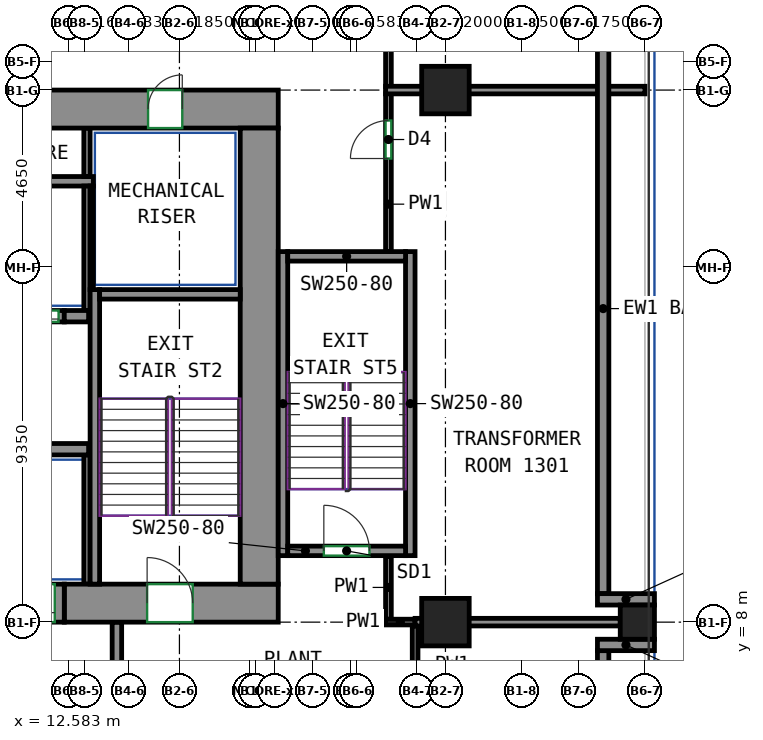
"""IFC4 building model, lengths in metres.
Left out: names, types, materials, properties, quantities, classifications, styles, units other than length and angle.
Written with IfcOpenShell. Run it as: python <this file> out.ifc"""

import sys

from ifc_helpers import new_model, si_unit, direction, frame, frame_2d, origin, origin_2d, place, context, subcontext, project, spatial, rectangle, extrude, source, transform, mapped, element, fill, save


model = new_model("IFC4")
c1 = context("Model", 3, precision=1e-05, world=origin(), true_north=direction((0.0, 1.0)))
c2 = subcontext(c1, "Body", "Model", "MODEL_VIEW")
j1 = project(units=[si_unit("LENGTHUNIT", "METRE"), si_unit("PLANEANGLEUNIT", "RADIAN")], contexts=[c1])
p1 = place(None, origin())
s1 = spatial("IfcSite", under=j1, at=p1, CompositionType="ELEMENT")
p2 = place(p1, origin())
s2 = spatial("IfcBuilding", under=s1, at=p2, CompositionType="ELEMENT")
p3 = place(p2, frame((0.0, 0.0, 59.0)))
s3 = spatial("IfcBuildingStorey", under=s2, at=p3, CompositionType="ELEMENT", Elevation=59.0)
m1 = source(origin(), c2, "Body", "SweptSolid", [
    extrude(rectangle(XDim=0.9, YDim=0.9, at=origin_2d()), origin(), (0.0, 0.0, 1.0), 3.8),
])
p4 = place(p3, frame((27.55, 8.0, 0.0), z_axis=(0.0, 0.0, 1.0), x_axis=(1.0, 0.0, 0.0)))
e1 = element("IfcColumn", 1, at=p4, inside=s3, PredefinedType="COLUMN", context=c2, shape_type="MappedRepresentation", body=[
    mapped(m1, transform((0.0, 0.0, 0.0))),
])
m2 = source(origin(), c2, "Body", "SweptSolid", [
    extrude(rectangle(XDim=1.25, YDim=1.25, at=origin_2d()), origin(), (0.0, 0.0, 1.0), 3.8),
])
for number, where, z_axis, x_axis in (
    (2, (22.5, 8.0, 0.0), (0.0, 0.0, 1.0), (1.0, 0.0, 0.0)),
    (3, (22.5, 22.0, 0.0), (0.0, 0.0, 1.0), (1.0, 0.0, 0.0)),
):
    element("IfcColumn", number, at=place(p3, frame(where, z_axis=z_axis, x_axis=x_axis)), inside=s3, PredefinedType="COLUMN", context=c2, shape_type="MappedRepresentation", body=[
        mapped(m2, transform((0.0, 0.0, 0.0))),
    ])
m3 = source(origin(), c2, "Body", "SweptSolid", [
    extrude(rectangle(XDim=5.63, YDim=1.0, at=frame_2d((2.815, 0.0))), origin(), (0.0, 0.0, 1.0), 3.8),
])
p5 = place(p3, frame((12.47, 8.5, 0.0), z_axis=(0.0, 0.0, 1.0), x_axis=(1.0, 0.0, 0.0)))
e4 = element("IfcWall", 4, at=p5, inside=s3, PredefinedType="SHEAR", context=c2, shape_type="MappedRepresentation", body=[
    mapped(m3, transform((0.0, 0.0, 0.0))),
])
p6 = place(p5, frame((2.18, 0.0, 0.0)))
e5 = element("IfcOpeningElement", 5, at=p6, cuts=e4, PredefinedType="OPENING", context=c2, shape_type="SweptSolid", body=[
    extrude(rectangle(XDim=1.2, YDim=2.1, at=frame_2d((0.6, 1.05))), frame((0.0, 0.51, 0.0), z_axis=(0.0, -1.0, 0.0), x_axis=(1.0, 0.0, 0.0)), (0.0, 0.0, 1.0), 1.02),
])
m4 = source(origin(), c2, "Body", "SweptSolid", [
    extrude(rectangle(XDim=34.1, YDim=1.0, at=frame_2d((17.05, 0.0))), origin(), (0.0, 0.0, 1.0), 3.8),
])
p7 = place(p3, frame((-16.0, 21.5, 0.0), z_axis=(0.0, 0.0, 1.0), x_axis=(1.0, 0.0, 0.0)))
e6 = element("IfcWall", 6, at=p7, inside=s3, PredefinedType="SHEAR", context=c2, shape_type="MappedRepresentation", body=[
    mapped(m4, transform((0.0, 0.0, 0.0))),
])
p8 = place(p7, frame((6.831, 0.0, 0.0)))
e7 = element("IfcOpeningElement", 7, at=p8, cuts=e6, PredefinedType="OPENING", context=c2, shape_type="SweptSolid", body=[
    extrude(rectangle(XDim=0.9, YDim=2.1, at=frame_2d((0.45, 1.05))), frame((0.0, 0.51, 0.0), z_axis=(0.0, -1.0, 0.0), x_axis=(1.0, 0.0, 0.0)), (0.0, 0.0, 1.0), 1.02),
])
p9 = place(p7, frame((12.138, 0.0, 0.0)))
e8 = element("IfcOpeningElement", 8, at=p9, cuts=e6, PredefinedType="OPENING", context=c2, shape_type="SweptSolid", body=[
    extrude(rectangle(XDim=0.9, YDim=2.1, at=frame_2d((0.45, 1.05))), frame((0.0, 0.51, 0.0), z_axis=(0.0, -1.0, 0.0), x_axis=(1.0, 0.0, 0.0)), (0.0, 0.0, 1.0), 1.02),
])
p10 = place(p7, frame((17.565, 0.0, 0.0)))
e9 = element("IfcOpeningElement", 9, at=p10, cuts=e6, PredefinedType="OPENING", context=c2, shape_type="SweptSolid", body=[
    extrude(rectangle(XDim=0.9, YDim=2.1, at=frame_2d((0.45, 1.05))), frame((0.0, 0.51, 0.0), z_axis=(0.0, -1.0, 0.0), x_axis=(1.0, 0.0, 0.0)), (0.0, 0.0, 1.0), 1.02),
])
p11 = place(p7, frame((21.786, 0.0, 0.0)))
e10 = element("IfcOpeningElement", 10, at=p11, cuts=e6, PredefinedType="OPENING", context=c2, shape_type="SweptSolid", body=[
    extrude(rectangle(XDim=0.9, YDim=2.1, at=frame_2d((0.45, 1.05))), frame((0.0, 0.51, 0.0), z_axis=(0.0, -1.0, 0.0), x_axis=(1.0, 0.0, 0.0)), (0.0, 0.0, 1.0), 1.02),
])
p12 = place(p7, frame((26.127, 0.0, 0.0)))
e11 = element("IfcOpeningElement", 11, at=p12, cuts=e6, PredefinedType="OPENING", context=c2, shape_type="SweptSolid", body=[
    extrude(rectangle(XDim=0.9, YDim=2.1, at=frame_2d((0.45, 1.05))), frame((0.0, 0.51, 0.0), z_axis=(0.0, -1.0, 0.0), x_axis=(1.0, 0.0, 0.0)), (0.0, 0.0, 1.0), 1.02),
])
p13 = place(p7, frame((2.525, 0.0, 0.0)))
e12 = element("IfcOpeningElement", 12, at=p13, cuts=e6, PredefinedType="OPENING", context=c2, shape_type="SweptSolid", body=[
    extrude(rectangle(XDim=0.9, YDim=2.1, at=frame_2d((0.45, 1.05))), frame((0.0, 0.51, 0.0), z_axis=(0.0, -1.0, 0.0), x_axis=(1.0, 0.0, 0.0)), (0.0, 0.0, 1.0), 1.02),
])
p14 = place(p7, frame((30.675, 0.0, 0.0)))
e13 = element("IfcOpeningElement", 13, at=p14, cuts=e6, PredefinedType="OPENING", context=c2, shape_type="SweptSolid", body=[
    extrude(rectangle(XDim=0.9, YDim=2.1, at=frame_2d((0.45, 1.05))), frame((0.0, 0.51, 0.0), z_axis=(0.0, -1.0, 0.0), x_axis=(1.0, 0.0, 0.0)), (0.0, 0.0, 1.0), 1.02),
])
m5 = source(origin(), c2, "Body", "SweptSolid", [
    extrude(rectangle(XDim=12.0, YDim=1.0, at=frame_2d((6.0, 0.0))), origin(), (0.0, 0.0, 1.0), 3.8),
])
p15 = place(p3, frame((17.6, 9.0, 0.0), z_axis=(0.0, 0.0, 1.0), x_axis=(0.0, 1.0, 0.0)))
e14 = element("IfcWall", 14, at=p15, inside=s3, PredefinedType="SHEAR", context=c2, shape_type="MappedRepresentation", body=[
    mapped(m5, transform((0.0, 0.0, 0.0))),
])
m6 = source(origin(), c2, "Body", "SweptSolid", [
    extrude(rectangle(XDim=7.75, YDim=0.25, at=frame_2d((3.875, 0.0))), origin(), (0.0, 0.0, 1.0), 3.8),
])
p16 = place(p3, frame((13.275, 9.0, 0.0), z_axis=(0.0, 0.0, 1.0), x_axis=(0.0, 1.0, 0.0)))
e15 = element("IfcWall", 15, at=p16, inside=s3, PredefinedType="SHEAR", context=c2, shape_type="MappedRepresentation", body=[
    mapped(m6, transform((0.0, 0.0, 0.0))),
])
m7 = source(origin(), c2, "Body", "SweptSolid", [
    extrude(rectangle(XDim=3.7, YDim=0.25, at=frame_2d((1.85, 0.0))), origin(), (0.0, 0.0, 1.0), 3.8),
])
p17 = place(p3, frame((13.4, 16.625, 0.0), z_axis=(0.0, 0.0, 1.0), x_axis=(1.0, 0.0, 0.0)))
e16 = element("IfcWall", 16, at=p17, inside=s3, PredefinedType="SHEAR", context=c2, shape_type="MappedRepresentation", body=[
    mapped(m7, transform((0.0, 0.0, 0.0))),
])
m8 = source(origin(), c2, "Body", "SweptSolid", [
    extrude(rectangle(XDim=8.0, YDim=0.25, at=frame_2d((4.0, 0.0))), origin(), (0.0, 0.0, 1.0), 3.8),
])
for number, where, z_axis, x_axis in (
    (17, (18.225, 9.75, 0.0), (0.0, 0.0, 1.0), (0.0, 1.0, 0.0)),
    (18, (21.575, 9.75, 0.0), (0.0, 0.0, 1.0), (0.0, 1.0, 0.0)),
):
    element("IfcWall", number, at=place(p3, frame(where, z_axis=z_axis, x_axis=x_axis)), inside=s3, PredefinedType="SHEAR", context=c2, shape_type="MappedRepresentation", body=[
        mapped(m8, transform((0.0, 0.0, 0.0))),
    ])
m9 = source(origin(), c2, "Body", "SweptSolid", [
    extrude(rectangle(XDim=3.1, YDim=0.25, at=frame_2d((1.55, 0.0))), origin(), (0.0, 0.0, 1.0), 3.8),
])
p18 = place(p3, frame((18.35, 9.875, 0.0), z_axis=(0.0, 0.0, 1.0), x_axis=(1.0, 0.0, 0.0)))
e19 = element("IfcWall", 19, at=p18, inside=s3, PredefinedType="SHEAR", context=c2, shape_type="MappedRepresentation", body=[
    mapped(m9, transform((0.0, 0.0, 0.0))),
])
p19 = place(p18, frame((0.95, 0.0, 0.0)))
e20 = element("IfcOpeningElement", 20, at=p19, cuts=e19, PredefinedType="OPENING", context=c2, shape_type="SweptSolid", body=[
    extrude(rectangle(XDim=1.2, YDim=2.1, at=frame_2d((0.6, 1.05))), frame((0.0, 0.135, 0.0), z_axis=(0.0, -1.0, 0.0), x_axis=(1.0, 0.0, 0.0)), (0.0, 0.0, 1.0), 0.27),
])
p20 = place(p3, frame((18.35, 17.625, 0.0), z_axis=(0.0, 0.0, 1.0), x_axis=(1.0, 0.0, 0.0)))
e21 = element("IfcWall", 21, at=p20, inside=s3, PredefinedType="SHEAR", context=c2, shape_type="MappedRepresentation", body=[
    mapped(m9, transform((0.0, 0.0, 0.0))),
])
m10 = source(origin(), c2, "Body", "SweptSolid", [
    extrude(rectangle(XDim=2.82, YDim=0.3, at=frame_2d((1.41, 0.0))), origin(), (0.0, 0.0, 1.0), 3.8),
])
p21 = place(p3, frame((10.29, 12.55, 0.0), z_axis=(0.0, 0.0, 1.0), x_axis=(1.0, 0.0, 0.0)))
e22 = element("IfcWall", 22, at=p21, inside=s3, PredefinedType="SHEAR", context=c2, shape_type="MappedRepresentation", body=[
    mapped(m10, transform((0.0, 0.0, 0.0))),
])
m11 = source(origin(), c2, "Body", "SweptSolid", [
    extrude(rectangle(XDim=0.64, YDim=0.3, at=frame_2d((0.32, 0.0))), origin(), (0.0, 0.0, 1.0), 3.8),
])
p22 = place(p3, frame((12.47, 16.05, 0.0), z_axis=(0.0, 0.0, 1.0), x_axis=(1.0, 0.0, 0.0)))
e23 = element("IfcWall", 23, at=p22, inside=s3, PredefinedType="SHEAR", context=c2, shape_type="MappedRepresentation", body=[
    mapped(m11, transform((0.0, 0.0, 0.0))),
])
m12 = source(origin(), c2, "Body", "SweptSolid", [
    extrude(rectangle(XDim=7.5, YDim=0.3, at=frame_2d((3.75, 0.0))), origin(), (0.0, 0.0, 1.0), 1.1),
])
p23 = place(p3, frame((26.65, -0.25, 0.0), z_axis=(0.0, 0.0, 1.0), x_axis=(0.0, 1.0, 0.0)))
e24 = element("IfcWall", 24, at=p23, inside=s3, PredefinedType="SOLIDWALL", context=c2, shape_type="MappedRepresentation", body=[
    mapped(m12, transform((0.0, 0.0, 0.0))),
])
m13 = source(origin(), c2, "Body", "SweptSolid", [
    extrude(rectangle(XDim=1.5, YDim=0.3, at=frame_2d((0.75, 0.0))), origin(), (0.0, 0.0, 1.0), 3.8),
])
p24 = place(p3, frame((28.0, 7.4, 0.0), z_axis=(0.0, 0.0, 1.0), x_axis=(-1.0, 0.0, 0.0)))
e25 = element("IfcWall", 25, at=p24, inside=s3, PredefinedType="SOLIDWALL", context=c2, shape_type="MappedRepresentation", body=[
    mapped(m13, transform((0.0, 0.0, 0.0))),
])
m14 = source(origin(), c2, "Body", "SweptSolid", [
    extrude(rectangle(XDim=15.0, YDim=0.3, at=frame_2d((7.5, 0.0))), origin(), (0.0, 0.0, 1.0), 1.1),
])
p25 = place(p3, frame((26.65, 8.75, 0.0), z_axis=(0.0, 0.0, 1.0), x_axis=(0.0, 1.0, 0.0)))
e26 = element("IfcWall", 26, at=p25, inside=s3, PredefinedType="SOLIDWALL", context=c2, shape_type="MappedRepresentation", body=[
    mapped(m14, transform((0.0, 0.0, 0.0))),
])
p26 = place(p3, frame((28.0, 8.6, 0.0), z_axis=(0.0, 0.0, 1.0), x_axis=(-1.0, 0.0, 0.0)))
e27 = element("IfcWall", 27, at=p26, inside=s3, PredefinedType="SOLIDWALL", context=c2, shape_type="MappedRepresentation", body=[
    mapped(m13, transform((0.0, 0.0, 0.0))),
])
m15 = source(origin(), c2, "Body", "SweptSolid", [
    extrude(rectangle(XDim=1.4, YDim=0.3, at=frame_2d((0.7, 0.0))), origin(), (0.0, 0.0, 1.0), 3.8),
])
p27 = place(p3, frame((11.07, 16.05, 0.0), z_axis=(0.0, 0.0, 1.0), x_axis=(1.0, 0.0, 0.0)))
e28 = element("IfcWall", 28, at=p27, inside=s3, PredefinedType="PARTITIONING", context=c2, shape_type="MappedRepresentation", body=[
    mapped(m15, transform((0.0, 0.0, 0.0))),
])
p28 = place(p27, frame((0.15, 0.0, 0.0)))
e29 = element("IfcOpeningElement", 29, at=p28, cuts=e28, PredefinedType="OPENING", context=c2, shape_type="SweptSolid", body=[
    extrude(rectangle(XDim=1.1, YDim=2.1, at=frame_2d((0.55, 1.05))), frame((0.0, 0.16, 0.0), z_axis=(0.0, -1.0, 0.0), x_axis=(1.0, 0.0, 0.0)), (0.0, 0.0, 1.0), 0.32),
])
m16 = source(origin(), c2, "Body", "SweptSolid", [
    extrude(rectangle(XDim=2.65, YDim=0.25, at=frame_2d((1.325, 0.0))), origin(), (0.0, 0.0, 1.0), 3.8),
])
p29 = place(p3, frame((13.855, 5.35, 0.0), z_axis=(0.0, 0.0, 1.0), x_axis=(0.0, 1.0, 0.0)))
e30 = element("IfcWall", 30, at=p29, inside=s3, PredefinedType="PARTITIONING", context=c2, shape_type="MappedRepresentation", body=[
    mapped(m16, transform((0.0, 0.0, 0.0))),
])
m17 = source(origin(), c2, "Body", "SweptSolid", [
    extrude(rectangle(XDim=24.37, YDim=0.25, at=frame_2d((12.185, 0.0))), origin(), (0.0, 0.0, 1.0), 3.8),
])
p30 = place(p3, frame((-11.135, 19.6, 0.0), z_axis=(0.0, 0.0, 1.0), x_axis=(1.0, 0.0, 0.0)))
e31 = element("IfcWall", 31, at=p30, inside=s3, PredefinedType="PARTITIONING", context=c2, shape_type="MappedRepresentation", body=[
    mapped(m17, transform((0.0, 0.0, 0.0))),
])
m18 = source(origin(), c2, "Body", "SweptSolid", [
    extrude(rectangle(XDim=3.275, YDim=0.165, at=frame_2d((1.638, 0.0))), origin(), (0.0, 0.0, 1.0), 3.8),
])
p31 = place(p3, frame((13.067, 16.2, 0.0), z_axis=(0.0, 0.0, 1.0), x_axis=(0.0, 1.0, 0.0)))
e32 = element("IfcWall", 32, at=p31, inside=s3, PredefinedType="PARTITIONING", context=c2, shape_type="MappedRepresentation", body=[
    mapped(m18, transform((0.0, 0.0, 0.0))),
])
m19 = source(origin(), c2, "Body", "SweptSolid", [
    extrude(rectangle(XDim=1.275, YDim=0.165, at=frame_2d((0.637, 0.0))), origin(), (0.0, 0.0, 1.0), 3.8),
])
p32 = place(p3, frame((13.067, 19.725, 0.0), z_axis=(0.0, 0.0, 1.0), x_axis=(0.0, 1.0, 0.0)))
e33 = element("IfcWall", 33, at=p32, inside=s3, PredefinedType="PARTITIONING", context=c2, shape_type="MappedRepresentation", body=[
    mapped(m19, transform((0.0, 0.0, 0.0))),
])
m20 = source(origin(), c2, "Body", "SweptSolid", [
    extrude(rectangle(XDim=2.725, YDim=0.085, at=frame_2d((1.363, 0.0))), origin(), (0.0, 0.0, 1.0), 3.8),
])
p33 = place(p3, frame((13.192, 16.75, 0.0), z_axis=(0.0, 0.0, 1.0), x_axis=(0.0, 1.0, 0.0)))
e34 = element("IfcWall", 34, at=p33, inside=s3, PredefinedType="PARTITIONING", context=c2, shape_type="MappedRepresentation", body=[
    mapped(m20, transform((0.0, 0.0, 0.0))),
])
m21 = source(origin(), c2, "Body", "SweptSolid", [
    extrude(rectangle(XDim=3.4, YDim=0.165, at=frame_2d((1.7, 0.0))), origin(), (0.0, 0.0, 1.0), 3.8),
])
p34 = place(p3, frame((13.067, 9.0, 0.0), z_axis=(0.0, 0.0, 1.0), x_axis=(0.0, 1.0, 0.0)))
e35 = element("IfcWall", 35, at=p34, inside=s3, PredefinedType="PARTITIONING", context=c2, shape_type="MappedRepresentation", body=[
    mapped(m21, transform((0.0, 0.0, 0.0))),
])
m22 = source(origin(), c2, "Body", "SweptSolid", [
    extrude(rectangle(XDim=1.4, YDim=1.0, at=frame_2d((0.7, 0.0))), origin(), (0.0, 0.0, 1.0), 2.7),
])
p35 = place(p3, frame((11.07, 8.5, 0.0), z_axis=(0.0, 0.0, 1.0), x_axis=(1.0, 0.0, 0.0)))
e36 = element("IfcWall", 36, at=p35, inside=s3, PredefinedType="PARTITIONING", context=c2, shape_type="MappedRepresentation", body=[
    mapped(m22, transform((0.0, 0.0, 0.0))),
])
p36 = place(p35, frame((0.25, 0.0, 0.0)))
e37 = element("IfcOpeningElement", 37, at=p36, cuts=e36, PredefinedType="OPENING", context=c2, shape_type="SweptSolid", body=[
    extrude(rectangle(XDim=0.9, YDim=2.1, at=frame_2d((0.45, 1.05))), frame((0.0, 0.51, 0.0), z_axis=(0.0, -1.0, 0.0), x_axis=(1.0, 0.0, 0.0)), (0.0, 0.0, 1.0), 1.02),
])
p37 = place(p3, frame((21.702, 5.848, 0.0), z_axis=(0.0, 0.0, 1.0), x_axis=(0.0, 1.0, 0.0)))
e38 = element("IfcWall", 38, at=p37, inside=s3, PredefinedType="PARTITIONING", context=c2, shape_type="SweptSolid", body=[
    extrude(rectangle(XDim=2.054, YDim=0.15, at=frame_2d((1.027, 0.0))), origin(), (0.0, 0.0, 1.0), 3.8),
])
p38 = place(p3, frame((21.0, 17.75, 0.0), z_axis=(0.0, 0.0, 1.0), x_axis=(0.0, 1.0, 0.0)))
e39 = element("IfcWall", 39, at=p38, inside=s3, PredefinedType="PARTITIONING", context=c2, shape_type="SweptSolid", body=[
    extrude(rectangle(XDim=4.16, YDim=0.15, at=frame_2d((2.08, 0.0))), origin(), (0.0, 0.0, 1.0), 3.8),
])
p39 = place(p38, frame((2.449, 0.0, 0.0)))
e40 = element("IfcOpeningElement", 40, at=p39, cuts=e39, PredefinedType="OPENING", context=c2, shape_type="SweptSolid", body=[
    extrude(rectangle(XDim=1.0, YDim=2.1, at=frame_2d((0.5, 1.05))), frame((0.0, 0.085, 0.0), z_axis=(0.0, -1.0, 0.0), x_axis=(1.0, 0.0, 0.0)), (0.0, 0.0, 1.0), 0.17),
])
p40 = place(p3, frame((21.0, 8.077, 0.0), z_axis=(0.0, 0.0, 1.0), x_axis=(0.0, 1.0, 0.0)))
e41 = element("IfcWall", 41, at=p40, inside=s3, PredefinedType="PARTITIONING", context=c2, shape_type="SweptSolid", body=[
    extrude(rectangle(XDim=1.673, YDim=0.15, at=frame_2d((0.836, 0.0))), origin(), (0.0, 0.0, 1.0), 3.8),
])
p41 = place(p3, frame((21.702, 8.002, 0.0), z_axis=(0.0, 0.0, 1.0), x_axis=(-1.0, 0.0, 0.0)))
e42 = element("IfcWall", 42, at=p41, inside=s3, PredefinedType="PARTITIONING", context=c2, shape_type="SweptSolid", body=[
    extrude(rectangle(XDim=0.777, YDim=0.15, at=frame_2d((0.388, 0.0))), origin(), (0.0, 0.0, 1.0), 3.8),
])
p42 = place(p3, frame((21.0, 22.09, 0.0), z_axis=(0.0, 0.0, 1.0), x_axis=(0.0, 1.0, 0.0)))
e43 = element("IfcWall", 43, at=p42, inside=s3, PredefinedType="PARTITIONING", context=c2, shape_type="SweptSolid", body=[
    extrude(rectangle(XDim=2.335, YDim=0.15, at=frame_2d((1.167, 0.0))), origin(), (0.0, 0.0, 1.0), 3.8),
])
p43 = place(p3, frame((21.702, 8.0, 0.0), z_axis=(0.0, 0.0, 1.0), x_axis=(1.0, 0.0, 0.0)))
e44 = element("IfcWall", 44, at=p43, inside=s3, PredefinedType="PARTITIONING", context=c2, shape_type="SweptSolid", body=[
    extrude(rectangle(XDim=5.398, YDim=0.2, at=frame_2d((2.699, 0.0))), origin(), (0.0, 0.0, 1.0), 3.8),
])
p44 = place(p3, frame((27.75, 22.0, 0.0), z_axis=(0.0, 0.0, 1.0), x_axis=(-1.0, 0.0, 0.0)))
e45 = element("IfcWall", 45, at=p44, inside=s3, PredefinedType="PARTITIONING", context=c2, shape_type="SweptSolid", body=[
    extrude(rectangle(XDim=0.98, YDim=0.2, at=frame_2d((0.49, 0.0))), origin(), (0.0, 0.0, 1.0), 3.8),
])
p45 = place(p3, frame((26.53, 22.0, 0.0), z_axis=(0.0, 0.0, 1.0), x_axis=(-1.0, 0.0, 0.0)))
e46 = element("IfcWall", 46, at=p45, inside=s3, PredefinedType="PARTITIONING", context=c2, shape_type="SweptSolid", body=[
    extrude(rectangle(XDim=5.604, YDim=0.2, at=frame_2d((2.802, 0.0))), origin(), (0.0, 0.0, 1.0), 3.8),
])
p46 = place(p36, origin())
e47 = element("IfcDoor", 47, at=p46, inside=s3, OperationType="SLIDING_TO_LEFT", PredefinedType="DOOR", context=c2, shape_type="SweptSolid", body=[
    extrude(rectangle(XDim=0.9, YDim=2.1, at=frame_2d((0.45, 1.05))), frame((0.0, 0.405, 0.0), z_axis=(0.0, -1.0, 0.0), x_axis=(1.0, 0.0, 0.0)), (0.0, 0.0, 1.0), 0.05),
])
fill(e37, e47)
p47 = place(p28, origin())
e48 = element("IfcDoor", 48, at=p47, inside=s3, OperationType="DOUBLE_DOOR_SLIDING", PredefinedType="DOOR", context=c2, shape_type="SweptSolid", body=[
    extrude(rectangle(XDim=1.1, YDim=2.1, at=frame_2d((0.55, 1.05))), frame((0.0, 0.025, 0.0), z_axis=(0.0, -1.0, 0.0), x_axis=(1.0, 0.0, 0.0)), (0.0, 0.0, 1.0), 0.05),
])
fill(e29, e48)
p48 = place(p14, origin())
e49 = element("IfcDoor", 49, at=p48, inside=s3, OperationType="SINGLE_SWING_RIGHT", PredefinedType="DOOR", context=c2, shape_type="SweptSolid", body=[
    extrude(rectangle(XDim=0.9, YDim=2.1, at=frame_2d((0.45, 1.05))), frame((0.0, -0.355, 0.0), z_axis=(0.0, -1.0, 0.0), x_axis=(1.0, 0.0, 0.0)), (0.0, 0.0, 1.0), 0.05),
])
fill(e13, e49)
p49 = place(p6, origin())
e50 = element("IfcDoor", 50, at=p49, inside=s3, OperationType="DOUBLE_DOOR_SINGLE_SWING", PredefinedType="DOOR", context=c2, shape_type="SweptSolid", body=[
    extrude(rectangle(XDim=1.2, YDim=2.1, at=frame_2d((0.6, 1.05))), frame((0.0, 0.405, 0.0), z_axis=(0.0, -1.0, 0.0), x_axis=(1.0, 0.0, 0.0)), (0.0, 0.0, 1.0), 0.05),
])
fill(e5, e50)
p50 = place(p19, origin())
e51 = element("IfcDoor", 51, at=p50, inside=s3, OperationType="DOUBLE_DOOR_SINGLE_SWING", PredefinedType="DOOR", context=c2, shape_type="SweptSolid", body=[
    extrude(rectangle(XDim=1.2, YDim=2.1, at=frame_2d((0.6, 1.05))), frame((0.0, 0.025, 0.0), z_axis=(0.0, -1.0, 0.0), x_axis=(1.0, 0.0, 0.0)), (0.0, 0.0, 1.0), 0.05),
])
fill(e20, e51)
p51 = place(p39, origin())
e52 = element("IfcDoor", 52, at=p51, inside=s3, OperationType="SINGLE_SWING_LEFT", PredefinedType="DOOR", context=c2, shape_type="SweptSolid", body=[
    extrude(rectangle(XDim=1.0, YDim=2.1, at=frame_2d((0.5, 1.05))), frame((0.0, 0.025, 0.0), z_axis=(0.0, -1.0, 0.0), x_axis=(1.0, 0.0, 0.0)), (0.0, 0.0, 1.0), 0.05),
])
fill(e40, e52)
save(model, sys.argv[1])
